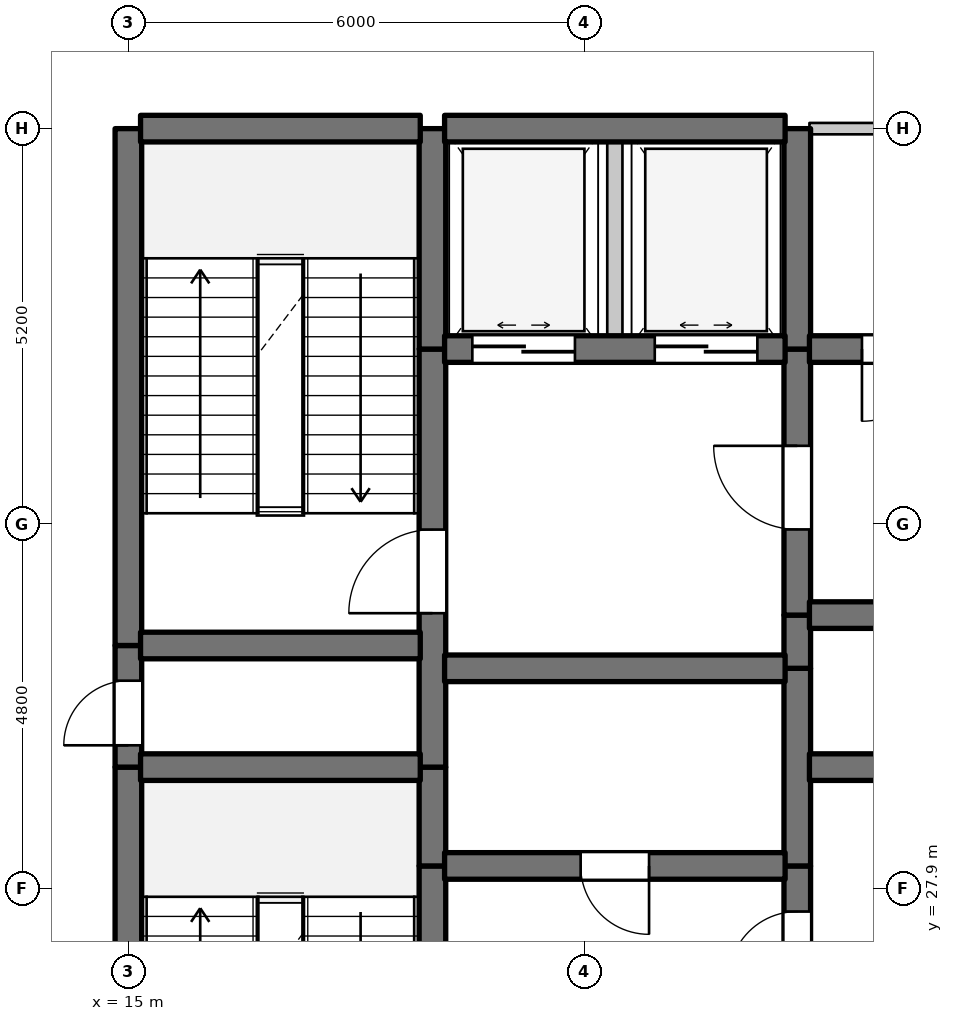
"""IFC4 building model, lengths in metres.
Left out: names, types, materials, properties, quantities, classifications, styles, units other than length and angle.
Written with IfcOpenShell. Run it as: python <this file> out.ifc"""

import sys

from ifc_helpers import new_model, si_unit, direction, frame, frame_2d, origin, place, context, subcontext, project, spatial, rectangle, extrude, element, fill, save


model = new_model("IFC4")
c1 = context("Model", 3, precision=1e-05, world=origin(), true_north=direction((0.0, 1.0)))
c2 = subcontext(c1, "Body", "Model", "MODEL_VIEW")
j1 = project(units=[si_unit("LENGTHUNIT", "METRE"), si_unit("PLANEANGLEUNIT", "RADIAN")], contexts=[c1])
p1 = place(None, origin())
s1 = spatial("IfcSite", under=j1, at=p1, CompositionType="ELEMENT")
p2 = place(p1, origin())
s2 = spatial("IfcBuilding", under=s1, at=p2, CompositionType="ELEMENT")
p3 = place(p2, frame((0.0, 0.0, 314.7)))
s3 = spatial("IfcBuildingStorey", under=s2, at=p3, CompositionType="ELEMENT", Elevation=314.7)
p4 = place(p3, frame((3.497, 23.993, 0.0), z_axis=(0.0, 0.0, 1.0), x_axis=(0.358990281293, 0.93334129767, 0.0)))
e1 = element("IfcWall", 1, at=p4, inside=s3, PredefinedType="STANDARD", context=c2, shape_type="SweptSolid", body=[
    extrude(rectangle(XDim=30.669, YDim=0.26, at=frame_2d((15.335, 0.0))), origin(), (0.0, 0.0, 1.0), 4.99),
])
p5 = place(p3, frame((15.0, 22.7, 0.0), z_axis=(0.0, 0.0, 1.0), x_axis=(0.0, 1.0, 0.0)))
e2 = element("IfcWall", 2, at=p5, inside=s3, PredefinedType="SHEAR", context=c2, shape_type="SweptSolid", body=[
    extrude(rectangle(XDim=6.8, YDim=0.35, at=frame_2d((3.4, 0.0))), origin(), (0.0, 0.0, 1.0), 4.99),
])
p6 = place(p3, frame((15.0, 29.5, 0.0), z_axis=(0.0, 0.0, 1.0), x_axis=(0.0, 1.0, 0.0)))
e3 = element("IfcWall", 3, at=p6, inside=s3, PredefinedType="SHEAR", context=c2, shape_type="SweptSolid", body=[
    extrude(rectangle(XDim=1.6, YDim=0.35, at=frame_2d((0.8, 0.0))), origin(), (0.0, 0.0, 1.0), 4.99),
])
p7 = place(p6, frame((0.287, 0.0, 0.0)))
e4 = element("IfcOpeningElement", 4, at=p7, cuts=e3, PredefinedType="OPENING", context=c2, shape_type="SweptSolid", body=[
    extrude(rectangle(XDim=0.85, YDim=2.1, at=frame_2d((0.425, 1.05))), frame((0.0, 0.185, 0.0), z_axis=(0.0, -1.0, 0.0), x_axis=(1.0, 0.0, 0.0)), (0.0, 0.0, 1.0), 0.37),
])
p8 = place(p3, frame((15.0, 31.1, 0.0), z_axis=(0.0, 0.0, 1.0), x_axis=(0.0, 1.0, 0.0)))
e5 = element("IfcWall", 5, at=p8, inside=s3, PredefinedType="SHEAR", context=c2, shape_type="SweptSolid", body=[
    extrude(rectangle(XDim=6.8, YDim=0.35, at=frame_2d((3.4, 0.0))), origin(), (0.0, 0.0, 1.0), 4.99),
])
p9 = place(p3, frame((19.0, 22.7, 0.0), z_axis=(0.0, 0.0, 1.0), x_axis=(0.0, 1.0, 0.0)))
e6 = element("IfcWall", 6, at=p9, inside=s3, PredefinedType="SHEAR", context=c2, shape_type="SweptSolid", body=[
    extrude(rectangle(XDim=5.5, YDim=0.35, at=frame_2d((2.75, 0.0))), origin(), (0.0, 0.0, 1.0), 4.99),
])
p10 = place(p9, frame((0.631, 0.0, 0.0)))
e7 = element("IfcOpeningElement", 7, at=p10, cuts=e6, PredefinedType="OPENING", context=c2, shape_type="SweptSolid", body=[
    extrude(rectangle(XDim=1.1, YDim=2.15, at=frame_2d((0.55, 1.075))), frame((0.0, 0.185, 0.0), z_axis=(0.0, -1.0, 0.0), x_axis=(1.0, 0.0, 0.0)), (0.0, 0.0, 1.0), 0.37),
])
p11 = place(p3, frame((19.0, 28.2, 0.0), z_axis=(0.0, 0.0, 1.0), x_axis=(0.0, 1.0, 0.0)))
e8 = element("IfcWall", 8, at=p11, inside=s3, PredefinedType="SHEAR", context=c2, shape_type="SweptSolid", body=[
    extrude(rectangle(XDim=1.3, YDim=0.35, at=frame_2d((0.65, 0.0))), origin(), (0.0, 0.0, 1.0), 4.99),
])
p12 = place(p3, frame((19.0, 29.5, 0.0), z_axis=(0.0, 0.0, 1.0), x_axis=(0.0, 1.0, 0.0)))
e9 = element("IfcWall", 9, at=p12, inside=s3, PredefinedType="SHEAR", context=c2, shape_type="SweptSolid", body=[
    extrude(rectangle(XDim=5.5, YDim=0.35, at=frame_2d((2.75, 0.0))), origin(), (0.0, 0.0, 1.0), 4.99),
])
p13 = place(p12, frame((2.025, 0.0, 0.0)))
e10 = element("IfcOpeningElement", 10, at=p13, cuts=e9, PredefinedType="OPENING", context=c2, shape_type="SweptSolid", body=[
    extrude(rectangle(XDim=1.1, YDim=2.15, at=frame_2d((0.55, 1.075))), frame((0.0, 0.185, 0.0), z_axis=(0.0, -1.0, 0.0), x_axis=(1.0, 0.0, 0.0)), (0.0, 0.0, 1.0), 0.37),
])
p14 = place(p3, frame((19.0, 35.0, 0.0), z_axis=(0.0, 0.0, 1.0), x_axis=(0.0, 1.0, 0.0)))
e11 = element("IfcWall", 11, at=p14, inside=s3, PredefinedType="SHEAR", context=c2, shape_type="SweptSolid", body=[
    extrude(rectangle(XDim=2.9, YDim=0.35, at=frame_2d((1.45, 0.0))), origin(), (0.0, 0.0, 1.0), 4.99),
])
p15 = place(p3, frame((21.4, 35.0, 0.0), z_axis=(0.0, 0.0, 1.0), x_axis=(0.0, 1.0, 0.0)))
e12 = element("IfcWall", 12, at=p15, inside=s3, PredefinedType="STANDARD", context=c2, shape_type="SweptSolid", body=[
    extrude(rectangle(XDim=2.9, YDim=0.2, at=frame_2d((1.45, 0.0))), origin(), (0.0, 0.0, 1.0), 4.99),
])
p16 = place(p3, frame((23.8, 26.1, 0.0), z_axis=(0.0, 0.0, 1.0), x_axis=(0.0, 1.0, 0.0)))
e13 = element("IfcWall", 13, at=p16, inside=s3, PredefinedType="SHEAR", context=c2, shape_type="SweptSolid", body=[
    extrude(rectangle(XDim=2.1, YDim=0.35, at=frame_2d((1.05, 0.0))), origin(), (0.0, 0.0, 1.0), 4.99),
])
p17 = place(p16, frame((0.6, 0.0, 0.0)))
e14 = element("IfcOpeningElement", 14, at=p17, cuts=e13, PredefinedType="OPENING", context=c2, shape_type="SweptSolid", body=[
    extrude(rectangle(XDim=0.9, YDim=2.15, at=frame_2d((0.45, 1.075))), frame((0.0, 0.185, 0.0), z_axis=(0.0, -1.0, 0.0), x_axis=(1.0, 0.0, 0.0)), (0.0, 0.0, 1.0), 0.37),
])
p18 = place(p3, frame((23.8, 28.2, 0.0), z_axis=(0.0, 0.0, 1.0), x_axis=(0.0, 1.0, 0.0)))
e15 = element("IfcWall", 15, at=p18, inside=s3, PredefinedType="SHEAR", context=c2, shape_type="SweptSolid", body=[
    extrude(rectangle(XDim=2.6, YDim=0.35, at=frame_2d((1.3, 0.0))), origin(), (0.0, 0.0, 1.0), 4.99),
])
p19 = place(p3, frame((23.8, 30.8, 0.0), z_axis=(0.0, 0.0, 1.0), x_axis=(0.0, 1.0, 0.0)))
e16 = element("IfcWall", 16, at=p19, inside=s3, PredefinedType="SHEAR", context=c2, shape_type="SweptSolid", body=[
    extrude(rectangle(XDim=0.7, YDim=0.35, at=frame_2d((0.35, 0.0))), origin(), (0.0, 0.0, 1.0), 4.99),
])
p20 = place(p3, frame((23.8, 31.5, 0.0), z_axis=(0.0, 0.0, 1.0), x_axis=(0.0, 1.0, 0.0)))
e17 = element("IfcWall", 17, at=p20, inside=s3, PredefinedType="SHEAR", context=c2, shape_type="SweptSolid", body=[
    extrude(rectangle(XDim=3.5, YDim=0.35, at=frame_2d((1.75, 0.0))), origin(), (0.0, 0.0, 1.0), 4.99),
])
p21 = place(p20, frame((1.127, 0.0, 0.0)))
e18 = element("IfcOpeningElement", 18, at=p21, cuts=e17, PredefinedType="OPENING", context=c2, shape_type="SweptSolid", body=[
    extrude(rectangle(XDim=1.1, YDim=2.15, at=frame_2d((0.55, 1.075))), frame((0.0, 0.185, 0.0), z_axis=(0.0, -1.0, 0.0), x_axis=(1.0, 0.0, 0.0)), (0.0, 0.0, 1.0), 0.37),
])
p22 = place(p3, frame((23.8, 35.0, 0.0), z_axis=(0.0, 0.0, 1.0), x_axis=(0.0, 1.0, 0.0)))
e19 = element("IfcWall", 19, at=p22, inside=s3, PredefinedType="SHEAR", context=c2, shape_type="SweptSolid", body=[
    extrude(rectangle(XDim=2.9, YDim=0.35, at=frame_2d((1.45, 0.0))), origin(), (0.0, 0.0, 1.0), 4.99),
])
p23 = place(p3, frame((19.16, 28.2, 0.0), z_axis=(0.0, 0.0, 1.0), x_axis=(1.0, 0.0, 0.0)))
e20 = element("IfcWall", 20, at=p23, inside=s3, PredefinedType="SHEAR", context=c2, shape_type="SweptSolid", body=[
    extrude(rectangle(XDim=4.48, YDim=0.35, at=frame_2d((2.24, 0.0))), origin(), (0.0, 0.0, 1.0), 4.99),
])
p24 = place(p23, frame((1.79, 0.0, 0.0)))
e21 = element("IfcOpeningElement", 21, at=p24, cuts=e20, PredefinedType="OPENING", context=c2, shape_type="SweptSolid", body=[
    extrude(rectangle(XDim=0.9, YDim=2.15, at=frame_2d((0.45, 1.075))), frame((0.0, 0.185, 0.0), z_axis=(0.0, -1.0, 0.0), x_axis=(1.0, 0.0, 0.0)), (0.0, 0.0, 1.0), 0.37),
])
p25 = place(p3, frame((15.16, 29.5, 0.0), z_axis=(0.0, 0.0, 1.0), x_axis=(1.0, 0.0, 0.0)))
e22 = element("IfcWall", 22, at=p25, inside=s3, PredefinedType="SHEAR", context=c2, shape_type="SweptSolid", body=[
    extrude(rectangle(XDim=3.68, YDim=0.35, at=frame_2d((1.84, 0.0))), origin(), (0.0, 0.0, 1.0), 4.99),
])
p26 = place(p3, frame((23.96, 29.5, 0.0), z_axis=(0.0, 0.0, 1.0), x_axis=(1.0, 0.0, 0.0)))
e23 = element("IfcWall", 23, at=p26, inside=s3, PredefinedType="SHEAR", context=c2, shape_type="SweptSolid", body=[
    extrude(rectangle(XDim=3.18, YDim=0.35, at=frame_2d((1.59, 0.0))), origin(), (0.0, 0.0, 1.0), 4.99),
])
p27 = place(p3, frame((19.16, 30.8, 0.0), z_axis=(0.0, 0.0, 1.0), x_axis=(1.0, 0.0, 0.0)))
e24 = element("IfcWall", 24, at=p27, inside=s3, PredefinedType="SHEAR", context=c2, shape_type="SweptSolid", body=[
    extrude(rectangle(XDim=4.48, YDim=0.35, at=frame_2d((2.24, 0.0))), origin(), (0.0, 0.0, 1.0), 4.99),
])
p28 = place(p3, frame((15.16, 31.1, 0.0), z_axis=(0.0, 0.0, 1.0), x_axis=(1.0, 0.0, 0.0)))
e25 = element("IfcWall", 25, at=p28, inside=s3, PredefinedType="SHEAR", context=c2, shape_type="SweptSolid", body=[
    extrude(rectangle(XDim=3.68, YDim=0.35, at=frame_2d((1.84, 0.0))), origin(), (0.0, 0.0, 1.0), 4.99),
])
p29 = place(p3, frame((23.96, 31.5, 0.0), z_axis=(0.0, 0.0, 1.0), x_axis=(1.0, 0.0, 0.0)))
e26 = element("IfcWall", 26, at=p29, inside=s3, PredefinedType="SHEAR", context=c2, shape_type="SweptSolid", body=[
    extrude(rectangle(XDim=3.18, YDim=0.35, at=frame_2d((1.59, 0.0))), origin(), (0.0, 0.0, 1.0), 4.99),
])
p30 = place(p29, frame((1.094, 0.0, 0.0)))
e27 = element("IfcOpeningElement", 27, at=p30, cuts=e26, PredefinedType="OPENING", context=c2, shape_type="SweptSolid", body=[
    extrude(rectangle(XDim=0.85, YDim=2.1, at=frame_2d((0.425, 1.05))), frame((0.0, 0.185, 0.0), z_axis=(0.0, -1.0, 0.0), x_axis=(1.0, 0.0, 0.0)), (0.0, 0.0, 1.0), 0.37),
])
p31 = place(p3, frame((19.16, 35.0, 0.0), z_axis=(0.0, 0.0, 1.0), x_axis=(1.0, 0.0, 0.0)))
e28 = element("IfcWall", 28, at=p31, inside=s3, PredefinedType="SHEAR", context=c2, shape_type="SweptSolid", body=[
    extrude(rectangle(XDim=4.48, YDim=0.35, at=frame_2d((2.24, 0.0))), origin(), (0.0, 0.0, 1.0), 4.99),
])
p32 = place(p31, frame((0.365, 0.0, 0.0)))
e29 = element("IfcOpeningElement", 29, at=p32, cuts=e28, PredefinedType="OPENING", context=c2, shape_type="SweptSolid", body=[
    extrude(rectangle(XDim=1.35, YDim=2.2, at=frame_2d((0.675, 1.1))), frame((0.0, 0.185, 0.0), z_axis=(0.0, -1.0, 0.0), x_axis=(1.0, 0.0, 0.0)), (0.0, 0.0, 1.0), 0.37),
])
p33 = place(p31, frame((2.765, 0.0, 0.0)))
e30 = element("IfcOpeningElement", 30, at=p33, cuts=e28, PredefinedType="OPENING", context=c2, shape_type="SweptSolid", body=[
    extrude(rectangle(XDim=1.35, YDim=2.2, at=frame_2d((0.675, 1.1))), frame((0.0, 0.185, 0.0), z_axis=(0.0, -1.0, 0.0), x_axis=(1.0, 0.0, 0.0)), (0.0, 0.0, 1.0), 0.37),
])
p34 = place(p3, frame((23.96, 35.0, 0.0), z_axis=(0.0, 0.0, 1.0), x_axis=(1.0, 0.0, 0.0)))
e31 = element("IfcWall", 31, at=p34, inside=s3, PredefinedType="SHEAR", context=c2, shape_type="SweptSolid", body=[
    extrude(rectangle(XDim=2.595, YDim=0.35, at=frame_2d((1.297, 0.0))), origin(), (0.0, 0.0, 1.0), 4.99),
])
p35 = place(p34, frame((0.691, 0.0, 0.0)))
e32 = element("IfcOpeningElement", 32, at=p35, cuts=e31, PredefinedType="OPENING", context=c2, shape_type="SweptSolid", body=[
    extrude(rectangle(XDim=0.95, YDim=2.15, at=frame_2d((0.475, 1.075))), frame((0.0, 0.185, 0.0), z_axis=(0.0, -1.0, 0.0), x_axis=(1.0, 0.0, 0.0)), (0.0, 0.0, 1.0), 0.37),
])
p36 = place(p3, frame((15.16, 37.9, 0.0), z_axis=(0.0, 0.0, 1.0), x_axis=(1.0, 0.0, 0.0)))
e33 = element("IfcWall", 33, at=p36, inside=s3, PredefinedType="SHEAR", context=c2, shape_type="SweptSolid", body=[
    extrude(rectangle(XDim=3.68, YDim=0.35, at=frame_2d((1.84, 0.0))), origin(), (0.0, 0.0, 1.0), 4.99),
])
p37 = place(p3, frame((19.16, 37.9, 0.0), z_axis=(0.0, 0.0, 1.0), x_axis=(1.0, 0.0, 0.0)))
e34 = element("IfcWall", 34, at=p37, inside=s3, PredefinedType="SHEAR", context=c2, shape_type="SweptSolid", body=[
    extrude(rectangle(XDim=4.48, YDim=0.35, at=frame_2d((2.24, 0.0))), origin(), (0.0, 0.0, 1.0), 4.99),
])
p38 = place(p3, frame((23.96, 37.9, 0.0), z_axis=(0.0, 0.0, 1.0), x_axis=(1.0, 0.0, 0.0)))
e35 = element("IfcWall", 35, at=p38, inside=s3, PredefinedType="STANDARD", context=c2, shape_type="SweptSolid", body=[
    extrude(rectangle(XDim=2.595, YDim=0.15, at=frame_2d((1.297, 0.0))), origin(), (0.0, 0.0, 1.0), 4.49),
])
p39 = place(p7, origin())
e36 = element("IfcDoor", 36, at=p39, inside=s3, OperationType="SINGLE_SWING_LEFT", PredefinedType="DOOR", context=c2, shape_type="SweptSolid", body=[
    extrude(rectangle(XDim=0.85, YDim=2.1, at=frame_2d((0.425, 1.05))), frame((0.0, 0.025, 0.0), z_axis=(0.0, -1.0, 0.0), x_axis=(1.0, 0.0, 0.0)), (0.0, 0.0, 1.0), 0.05),
])
fill(e4, e36)
p40 = place(p13, origin())
e37 = element("IfcDoor", 37, at=p40, inside=s3, OperationType="SINGLE_SWING_LEFT", PredefinedType="DOOR", context=c2, shape_type="SweptSolid", body=[
    extrude(rectangle(XDim=1.1, YDim=2.15, at=frame_2d((0.55, 1.075))), frame((0.0, 0.025, 0.0), z_axis=(0.0, -1.0, 0.0), x_axis=(1.0, 0.0, 0.0)), (0.0, 0.0, 1.0), 0.05),
])
fill(e10, e37)
p41 = place(p17, origin())
e38 = element("IfcDoor", 38, at=p41, inside=s3, OperationType="SINGLE_SWING_LEFT", PredefinedType="DOOR", context=c2, shape_type="SweptSolid", body=[
    extrude(rectangle(XDim=0.9, YDim=2.15, at=frame_2d((0.45, 1.075))), frame((0.0, 0.025, 0.0), z_axis=(0.0, -1.0, 0.0), x_axis=(1.0, 0.0, 0.0)), (0.0, 0.0, 1.0), 0.05),
])
fill(e14, e38)
p42 = place(p21, origin())
e39 = element("IfcDoor", 39, at=p42, inside=s3, OperationType="SINGLE_SWING_RIGHT", PredefinedType="DOOR", context=c2, shape_type="SweptSolid", body=[
    extrude(rectangle(XDim=1.1, YDim=2.15, at=frame_2d((0.55, 1.075))), frame((0.0, 0.025, 0.0), z_axis=(0.0, -1.0, 0.0), x_axis=(1.0, 0.0, 0.0)), (0.0, 0.0, 1.0), 0.05),
])
fill(e18, e39)
p43 = place(p24, frame((0.9, 0.0, 0.0), z_axis=(0.0, 0.0, 1.0), x_axis=(-1.0, 0.0, 0.0)))
e40 = element("IfcDoor", 40, at=p43, inside=s3, OperationType="SINGLE_SWING_RIGHT", PredefinedType="DOOR", context=c2, shape_type="SweptSolid", body=[
    extrude(rectangle(XDim=0.9, YDim=2.15, at=frame_2d((0.45, 1.075))), frame((0.0, 0.025, 0.0), z_axis=(0.0, -1.0, 0.0), x_axis=(1.0, 0.0, 0.0)), (0.0, 0.0, 1.0), 0.05),
])
fill(e21, e40)
p44 = place(p32, origin())
e41 = element("IfcDoor", 41, at=p44, inside=s3, OperationType="DOUBLE_DOOR_SLIDING", PredefinedType="DOOR", context=c2, shape_type="SweptSolid", body=[
    extrude(rectangle(XDim=1.35, YDim=2.2, at=frame_2d((0.675, 1.1))), frame((0.0, 0.025, 0.0), z_axis=(0.0, -1.0, 0.0), x_axis=(1.0, 0.0, 0.0)), (0.0, 0.0, 1.0), 0.05),
])
fill(e29, e41)
p45 = place(p33, origin())
e42 = element("IfcDoor", 42, at=p45, inside=s3, OperationType="DOUBLE_DOOR_SLIDING", PredefinedType="DOOR", context=c2, shape_type="SweptSolid", body=[
    extrude(rectangle(XDim=1.35, YDim=2.2, at=frame_2d((0.675, 1.1))), frame((0.0, 0.025, 0.0), z_axis=(0.0, -1.0, 0.0), x_axis=(1.0, 0.0, 0.0)), (0.0, 0.0, 1.0), 0.05),
])
fill(e30, e42)
p46 = place(p35, frame((0.95, 0.0, 0.0), z_axis=(0.0, 0.0, 1.0), x_axis=(-1.0, 0.0, 0.0)))
e43 = element("IfcDoor", 43, at=p46, inside=s3, OperationType="SINGLE_SWING_LEFT", PredefinedType="DOOR", context=c2, shape_type="SweptSolid", body=[
    extrude(rectangle(XDim=0.95, YDim=2.15, at=frame_2d((0.475, 1.075))), frame((0.0, 0.025, 0.0), z_axis=(0.0, -1.0, 0.0), x_axis=(1.0, 0.0, 0.0)), (0.0, 0.0, 1.0), 0.05),
])
fill(e32, e43)
save(model, sys.argv[1])
